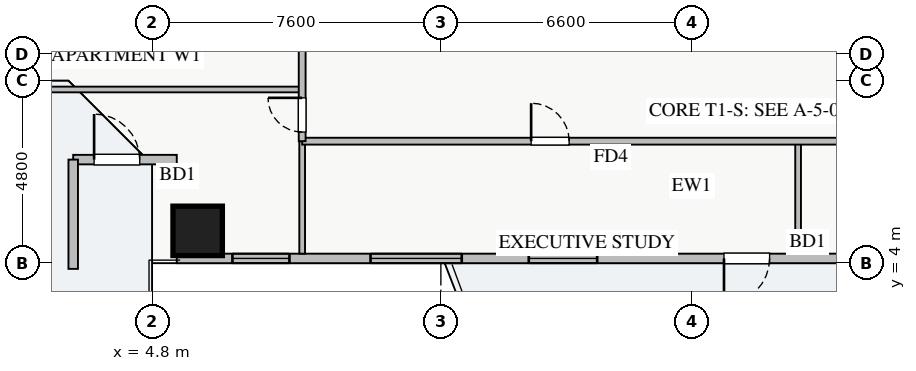
"""IFC4 building model, lengths in metres.
Left out: names, types, materials, properties, quantities, classifications, styles, units other than length and angle.
Written with IfcOpenShell. Run it as: python <this file> out.ifc"""

import sys

from ifc_helpers import new_model, si_unit, direction, frame, frame_2d, origin, origin_2d, place, context, subcontext, project, spatial, rectangle, extrude, source, transform, mapped, element, fill, save


model = new_model("IFC4")
c1 = context("Model", 3, precision=1e-05, world=origin(), true_north=direction((0.0, 1.0)))
c2 = subcontext(c1, "Body", "Model", "MODEL_VIEW")
j1 = project(units=[si_unit("LENGTHUNIT", "METRE"), si_unit("PLANEANGLEUNIT", "RADIAN")], contexts=[c1])
p1 = place(None, origin())
s1 = spatial("IfcSite", under=j1, at=p1, CompositionType="ELEMENT")
p2 = place(p1, origin())
s2 = spatial("IfcBuilding", under=s1, at=p2, CompositionType="ELEMENT")
p3 = place(p2, frame((0.0, 0.0, 63.25)))
s3 = spatial("IfcBuildingStorey", under=s2, at=p3, CompositionType="ELEMENT", Elevation=63.25)
m1 = source(origin(), c2, "Body", "SweptSolid", [
    extrude(rectangle(XDim=1.3, YDim=1.3, at=origin_2d()), origin(), (0.0, 0.0, 1.0), 3.25),
])
p4 = place(p3, frame((6.0, 4.85, 0.0), z_axis=(0.0, 0.0, 1.0), x_axis=(1.0, 0.0, 0.0)))
e1 = element("IfcColumn", 1, at=p4, inside=s3, PredefinedType="COLUMN", context=c2, shape_type="MappedRepresentation", body=[
    mapped(m1, transform((0.0, 0.0, 0.0), x_axis=(1.0, 0.0, 0.0), y_axis=(0.0, 1.0, 0.0), z_axis=(0.0, 0.0, 1.0), scale=1.0)),
])
p5 = place(p3, frame((5.45, 4.125, 0.0), z_axis=(0.0, 0.0, 1.0), x_axis=(1.0, 0.0, 0.0)))
e2 = element("IfcWall", 2, at=p5, inside=s3, PredefinedType="STANDARD", context=c2, shape_type="SweptSolid", body=[
    extrude(rectangle(XDim=27.1, YDim=0.25, at=frame_2d((13.55, 0.0))), origin(), (0.0, 0.0, 1.0), 2.61),
])
p6 = place(p5, frame((14.4, 0.0, 0.0)))
e3 = element("IfcOpeningElement", 3, at=p6, cuts=e2, PredefinedType="OPENING", context=c2, shape_type="SweptSolid", body=[
    extrude(rectangle(XDim=1.2, YDim=2.1, at=frame_2d((0.6, 1.05))), frame((0.0, 0.135, 0.0), z_axis=(0.0, -1.0, 0.0), x_axis=(1.0, 0.0, 0.0)), (0.0, 0.0, 1.0), 0.27),
])
p7 = place(p5, frame((1.465, 0.0, 0.9)))
e4 = element("IfcOpeningElement", 4, at=p7, cuts=e2, PredefinedType="OPENING", context=c2, shape_type="SweptSolid", body=[
    extrude(rectangle(XDim=1.5, YDim=1.5, at=frame_2d((0.75, 0.75))), frame((0.0, 0.135, 0.0), z_axis=(0.0, -1.0, 0.0), x_axis=(1.0, 0.0, 0.0)), (0.0, 0.0, 1.0), 0.27),
])
p8 = place(p5, frame((9.263, 0.0, 0.9)))
e5 = element("IfcOpeningElement", 5, at=p8, cuts=e2, PredefinedType="OPENING", context=c2, shape_type="SweptSolid", body=[
    extrude(rectangle(XDim=1.8, YDim=1.45, at=frame_2d((0.9, 0.725))), frame((0.0, 0.135, 0.0), z_axis=(0.0, -1.0, 0.0), x_axis=(1.0, 0.0, 0.0)), (0.0, 0.0, 1.0), 0.27),
])
p9 = place(p5, frame((18.774, 0.0, 0.9)))
e6 = element("IfcOpeningElement", 6, at=p9, cuts=e2, PredefinedType="OPENING", context=c2, shape_type="SweptSolid", body=[
    extrude(rectangle(XDim=1.5, YDim=1.5, at=frame_2d((0.75, 0.75))), frame((0.0, 0.135, 0.0), z_axis=(0.0, -1.0, 0.0), x_axis=(1.0, 0.0, 0.0)), (0.0, 0.0, 1.0), 0.27),
])
p10 = place(p5, frame((22.663, 0.0, 0.9)))
e7 = element("IfcOpeningElement", 7, at=p10, cuts=e2, PredefinedType="OPENING", context=c2, shape_type="SweptSolid", body=[
    extrude(rectangle(XDim=2.1, YDim=1.48, at=frame_2d((1.05, 0.74))), frame((0.0, 0.135, 0.0), z_axis=(0.0, -1.0, 0.0), x_axis=(1.0, 0.0, 0.0)), (0.0, 0.0, 1.0), 0.27),
])
p11 = place(p5, frame((5.099, 0.0, 0.9)))
e8 = element("IfcOpeningElement", 8, at=p11, cuts=e2, PredefinedType="OPENING", context=c2, shape_type="SweptSolid", body=[
    extrude(rectangle(XDim=2.4, YDim=1.5, at=frame_2d((1.2, 0.75))), frame((0.0, 0.135, 0.0), z_axis=(0.0, -1.0, 0.0), x_axis=(1.0, 0.0, 0.0)), (0.0, 0.0, 1.0), 0.27),
])
p12 = place(p3, frame((2.725, 6.725, 0.0), z_axis=(0.0, 0.0, 1.0), x_axis=(1.0, 0.0, 0.0)))
e9 = element("IfcWall", 9, at=p12, inside=s3, PredefinedType="STANDARD", context=c2, shape_type="SweptSolid", body=[
    extrude(rectangle(XDim=2.725, YDim=0.25, at=frame_2d((1.362, 0.0))), origin(), (0.0, 0.0, 1.0), 2.61),
])
p13 = place(p12, frame((0.55, 0.0, 0.0)))
e10 = element("IfcOpeningElement", 10, at=p13, cuts=e9, PredefinedType="OPENING", context=c2, shape_type="SweptSolid", body=[
    extrude(rectangle(XDim=1.2, YDim=2.1, at=frame_2d((0.6, 1.05))), frame((0.0, 0.135, 0.0), z_axis=(0.0, -1.0, 0.0), x_axis=(1.0, 0.0, 0.0)), (0.0, 0.0, 1.0), 0.27),
])
p14 = place(p3, frame((2.725, 3.85, 0.0), z_axis=(0.0, 0.0, 1.0), x_axis=(0.0, 1.0, 0.0)))
e11 = element("IfcWall", 11, at=p14, inside=s3, PredefinedType="STANDARD", context=c2, shape_type="SweptSolid", body=[
    extrude(rectangle(XDim=2.875, YDim=0.25, at=frame_2d((1.438, 0.0))), origin(), (0.0, 0.0, 1.0), 2.61),
])
for number, where, z_axis, x_axis in (
    (12, (21.8, 4.25, 0.0), (0.0, 0.0, 1.0), (0.0, 1.0, 0.0)),
    (13, (8.75, 4.25, 0.0), (0.0, 0.0, 1.0), (0.0, 1.0, 0.0)),
):
    element("IfcWall", number, at=place(p3, frame(where, z_axis=z_axis, x_axis=x_axis)), inside=s3, PredefinedType="PARTITIONING", context=c2, shape_type="SweptSolid", body=[
        extrude(rectangle(XDim=2.96, YDim=0.15, at=frame_2d((1.48, 0.0))), origin(), (0.0, 0.0, 1.0), 3.07),
    ])
p15 = place(p3, frame((8.75, 7.21, 0.0), z_axis=(0.0, 0.0, 1.0), x_axis=(1.0, 0.0, 0.0)))
e14 = element("IfcWall", 14, at=p15, inside=s3, PredefinedType="PARTITIONING", context=c2, shape_type="SweptSolid", body=[
    extrude(rectangle(XDim=23.61, YDim=0.18, at=frame_2d((11.805, 0.0))), origin(), (0.0, 0.0, 1.0), 3.07),
])
p16 = place(p15, frame((6.025, 0.0, 0.0)))
e15 = element("IfcOpeningElement", 15, at=p16, cuts=e14, PredefinedType="OPENING", context=c2, shape_type="SweptSolid", body=[
    extrude(rectangle(XDim=1.0, YDim=2.05, at=frame_2d((0.5, 1.025))), frame((0.0, 0.1, 0.0), z_axis=(0.0, -1.0, 0.0), x_axis=(1.0, 0.0, 0.0)), (0.0, 0.0, 1.0), 0.2),
])
p17 = place(p15, frame((17.83, 0.0, 0.0)))
e16 = element("IfcOpeningElement", 16, at=p17, cuts=e14, PredefinedType="OPENING", context=c2, shape_type="SweptSolid", body=[
    extrude(rectangle(XDim=1.0, YDim=2.05, at=frame_2d((0.5, 1.025))), frame((0.0, 0.1, 0.0), z_axis=(0.0, -1.0, 0.0), x_axis=(1.0, 0.0, 0.0)), (0.0, 0.0, 1.0), 0.2),
])
p18 = place(p3, frame((0.25, 8.57, 0.0), z_axis=(0.0, 0.0, 1.0), x_axis=(1.0, 0.0, 0.0)))
e17 = element("IfcWall", 17, at=p18, inside=s3, PredefinedType="PARTITIONING", context=c2, shape_type="SweptSolid", body=[
    extrude(rectangle(XDim=8.5, YDim=0.15, at=frame_2d((4.25, 0.0))), origin(), (0.0, 0.0, 1.0), 3.07),
])
p19 = place(p3, frame((8.75, 7.21, 0.0), z_axis=(0.0, 0.0, 1.0), x_axis=(0.0, 1.0, 0.0)))
e18 = element("IfcWall", 18, at=p19, inside=s3, PredefinedType="PARTITIONING", context=c2, shape_type="SweptSolid", body=[
    extrude(rectangle(XDim=31.23, YDim=0.18, at=frame_2d((15.615, 0.0))), origin(), (0.0, 0.0, 1.0), 3.07),
])
p20 = place(p19, frame((30.09, 0.0, 0.0)))
e19 = element("IfcOpeningElement", 19, at=p20, cuts=e18, PredefinedType="OPENING", context=c2, shape_type="SweptSolid", body=[
    extrude(rectangle(XDim=0.9, YDim=2.05, at=frame_2d((0.45, 1.025))), frame((0.0, 0.1, 0.0), z_axis=(0.0, -1.0, 0.0), x_axis=(1.0, 0.0, 0.0)), (0.0, 0.0, 1.0), 0.2),
])
p21 = place(p19, frame((0.24, 0.0, 0.0)))
e20 = element("IfcOpeningElement", 20, at=p21, cuts=e18, PredefinedType="OPENING", context=c2, shape_type="SweptSolid", body=[
    extrude(rectangle(XDim=0.9, YDim=2.05, at=frame_2d((0.45, 1.025))), frame((0.0, 0.1, 0.0), z_axis=(0.0, -1.0, 0.0), x_axis=(1.0, 0.0, 0.0)), (0.0, 0.0, 1.0), 0.2),
])
p22 = place(p19, frame((2.555, 0.0, 0.0)))
e21 = element("IfcOpeningElement", 21, at=p22, cuts=e18, PredefinedType="OPENING", context=c2, shape_type="SweptSolid", body=[
    extrude(rectangle(XDim=1.0, YDim=2.05, at=frame_2d((0.5, 1.025))), frame((0.0, 0.1, 0.0), z_axis=(0.0, -1.0, 0.0), x_axis=(1.0, 0.0, 0.0)), (0.0, 0.0, 1.0), 0.2),
])
p23 = place(p19, frame((11.91, 0.0, 0.0)))
e22 = element("IfcOpeningElement", 22, at=p23, cuts=e18, PredefinedType="OPENING", context=c2, shape_type="SweptSolid", body=[
    extrude(rectangle(XDim=1.0, YDim=2.05, at=frame_2d((0.5, 1.025))), frame((0.0, 0.1, 0.0), z_axis=(0.0, -1.0, 0.0), x_axis=(1.0, 0.0, 0.0)), (0.0, 0.0, 1.0), 0.2),
])
p24 = place(p19, frame((17.425, 0.0, 0.0)))
e23 = element("IfcOpeningElement", 23, at=p24, cuts=e18, PredefinedType="OPENING", context=c2, shape_type="SweptSolid", body=[
    extrude(rectangle(XDim=1.0, YDim=2.05, at=frame_2d((0.5, 1.025))), frame((0.0, 0.1, 0.0), z_axis=(0.0, -1.0, 0.0), x_axis=(1.0, 0.0, 0.0)), (0.0, 0.0, 1.0), 0.2),
])
p25 = place(p19, frame((23.76, 0.0, 0.0)))
e24 = element("IfcOpeningElement", 24, at=p25, cuts=e18, PredefinedType="OPENING", context=c2, shape_type="SweptSolid", body=[
    extrude(rectangle(XDim=1.0, YDim=2.05, at=frame_2d((0.5, 1.025))), frame((0.0, 0.1, 0.0), z_axis=(0.0, -1.0, 0.0), x_axis=(1.0, 0.0, 0.0)), (0.0, 0.0, 1.0), 0.2),
])
m2 = source(origin(), c2, "Body", "SweptSolid", [
    extrude(rectangle(XDim=1.2, YDim=2.1, at=frame_2d((0.6, 1.05))), frame((0.0, 0.025, 0.0), z_axis=(0.0, -1.0, 0.0), x_axis=(1.0, 0.0, 0.0)), (0.0, 0.0, 1.0), 0.05),
])
p26 = place(p6, frame((1.2, 0.0, 0.0), z_axis=(0.0, 0.0, 1.0), x_axis=(-1.0, 0.0, 0.0)))
e25 = element("IfcDoor", 25, at=p26, inside=s3, OperationType="SINGLE_SWING_LEFT", PredefinedType="DOOR", context=c2, shape_type="MappedRepresentation", body=[
    mapped(m2, transform((0.0, 0.0, 0.0), x_axis=(1.0, 0.0, 0.0), y_axis=(0.0, 1.0, 0.0), z_axis=(0.0, 0.0, 1.0), scale=1.0)),
])
fill(e3, e25)
m3 = source(origin(), c2, "Body", "SweptSolid", [
    extrude(rectangle(XDim=1.5, YDim=1.5, at=frame_2d((0.75, 0.75))), frame((0.0, 0.03, 0.0), z_axis=(0.0, -1.0, 0.0), x_axis=(1.0, 0.0, 0.0)), (0.0, 0.0, 1.0), 0.06),
])
p27 = place(p7, origin())
e26 = element("IfcWindow", 26, at=p27, inside=s3, PartitioningType="TRIPLE_PANEL_VERTICAL", PredefinedType="WINDOW", context=c2, shape_type="MappedRepresentation", body=[
    mapped(m3, transform((0.0, 0.0, 0.0), x_axis=(1.0, 0.0, 0.0), y_axis=(0.0, 1.0, 0.0), z_axis=(0.0, 0.0, 1.0), scale=1.0)),
])
fill(e4, e26)
m4 = source(origin(), c2, "Body", "SweptSolid", [
    extrude(rectangle(XDim=1.8, YDim=1.45, at=frame_2d((0.9, 0.725))), frame((0.0, 0.03, 0.0), z_axis=(0.0, -1.0, 0.0), x_axis=(1.0, 0.0, 0.0)), (0.0, 0.0, 1.0), 0.06),
])
p28 = place(p8, origin())
e27 = element("IfcWindow", 27, at=p28, inside=s3, PartitioningType="DOUBLE_PANEL_VERTICAL", PredefinedType="WINDOW", context=c2, shape_type="MappedRepresentation", body=[
    mapped(m4, transform((0.0, 0.0, 0.0), x_axis=(1.0, 0.0, 0.0), y_axis=(0.0, 1.0, 0.0), z_axis=(0.0, 0.0, 1.0), scale=1.0)),
])
fill(e5, e27)
p29 = place(p13, origin())
e28 = element("IfcDoor", 28, at=p29, inside=s3, OperationType="SINGLE_SWING_LEFT", PredefinedType="DOOR", context=c2, shape_type="MappedRepresentation", body=[
    mapped(m2, transform((0.0, 0.0, 0.0), x_axis=(1.0, 0.0, 0.0), y_axis=(0.0, 1.0, 0.0), z_axis=(0.0, 0.0, 1.0), scale=1.0)),
])
fill(e10, e28)
m5 = source(origin(), c2, "Body", "SweptSolid", [
    extrude(rectangle(XDim=1.0, YDim=2.05, at=frame_2d((0.5, 1.025))), frame((0.0, 0.025, 0.0), z_axis=(0.0, -1.0, 0.0), x_axis=(1.0, 0.0, 0.0)), (0.0, 0.0, 1.0), 0.05),
])
p30 = place(p16, origin())
e29 = element("IfcDoor", 29, at=p30, inside=s3, OperationType="SINGLE_SWING_LEFT", PredefinedType="DOOR", context=c2, shape_type="MappedRepresentation", body=[
    mapped(m5, transform((0.0, 0.0, 0.0), x_axis=(1.0, 0.0, 0.0), y_axis=(0.0, 1.0, 0.0), z_axis=(0.0, 0.0, 1.0), scale=1.0)),
])
fill(e15, e29)
m6 = source(origin(), c2, "Body", "SweptSolid", [
    extrude(rectangle(XDim=0.9, YDim=2.05, at=frame_2d((0.45, 1.025))), frame((0.0, 0.025, 0.0), z_axis=(0.0, -1.0, 0.0), x_axis=(1.0, 0.0, 0.0)), (0.0, 0.0, 1.0), 0.05),
])
p31 = place(p21, origin())
e30 = element("IfcDoor", 30, at=p31, inside=s3, OperationType="SINGLE_SWING_RIGHT", PredefinedType="DOOR", context=c2, shape_type="MappedRepresentation", body=[
    mapped(m6, transform((0.0, 0.0, 0.0), x_axis=(1.0, 0.0, 0.0), y_axis=(0.0, 1.0, 0.0), z_axis=(0.0, 0.0, 1.0), scale=1.0)),
])
fill(e20, e30)
m7 = source(origin(), c2, "Body", "SweptSolid", [
    extrude(rectangle(XDim=2.4, YDim=1.5, at=frame_2d((1.2, 0.75))), frame((0.0, 0.03, 0.0), z_axis=(0.0, -1.0, 0.0), x_axis=(1.0, 0.0, 0.0)), (0.0, 0.0, 1.0), 0.06),
])
p32 = place(p11, origin())
e31 = element("IfcWindow", 31, at=p32, inside=s3, PartitioningType="TRIPLE_PANEL_VERTICAL", PredefinedType="WINDOW", context=c2, shape_type="MappedRepresentation", body=[
    mapped(m7, transform((0.0, 0.0, 0.0), x_axis=(1.0, 0.0, 0.0), y_axis=(0.0, 1.0, 0.0), z_axis=(0.0, 0.0, 1.0), scale=1.0)),
])
fill(e8, e31)
save(model, sys.argv[1])
